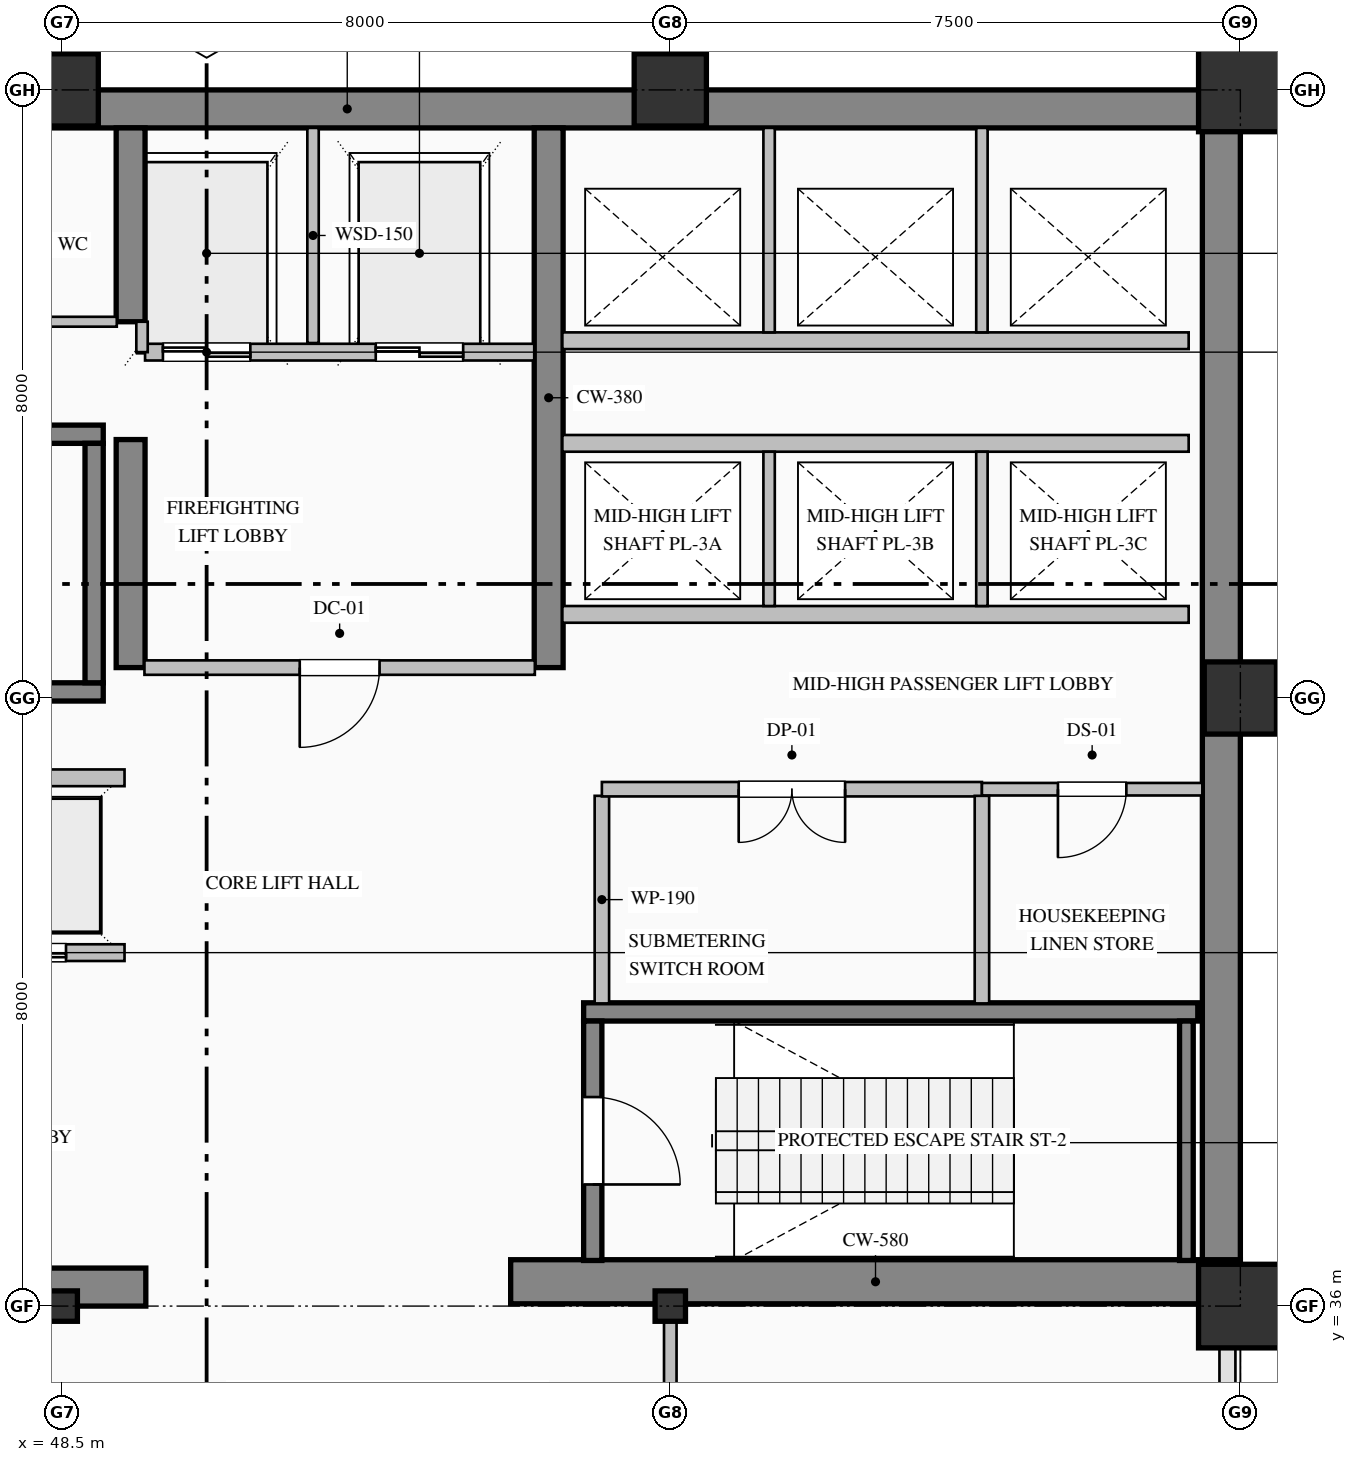
"""IFC4 building model, lengths in metres.
Left out: names, types, materials, properties, quantities, classifications, styles, units other than length and angle.
Written with IfcOpenShell. Run it as: python <this file> out.ifc"""

import sys

from ifc_helpers import new_model, si_unit, direction, frame, frame_2d, origin, origin_2d, place, context, subcontext, project, spatial, rectangle, hollow_rectangle, i_section, extrude, element, fill, save


model = new_model("IFC4")
c1 = context("Model", 3, precision=1e-05, world=origin(), true_north=direction((0.0, 1.0)))
c2 = subcontext(c1, "Body", "Model", "MODEL_VIEW")
j1 = project(units=[si_unit("LENGTHUNIT", "METRE"), si_unit("PLANEANGLEUNIT", "RADIAN")], contexts=[c1])
p1 = place(None, origin())
s1 = spatial("IfcSite", under=j1, at=p1, CompositionType="ELEMENT")
p2 = place(p1, origin())
s2 = spatial("IfcBuilding", under=s1, at=p2, CompositionType="ELEMENT")
p3 = place(p2, frame((0.0, 0.0, 113.6)))
s3 = spatial("IfcBuildingStorey", under=s2, at=p3, CompositionType="ELEMENT", Elevation=113.6)
p4 = place(p3, frame((40.5, 51.75, 0.0), z_axis=(0.0, 0.0, 1.0), x_axis=(1.0, 0.0, 0.0)))
e1 = element("IfcWall", 1, at=p4, inside=s3, PredefinedType="SHEAR", context=c2, shape_type="SweptSolid", body=[
    extrude(rectangle(XDim=23.5, YDim=0.5, at=frame_2d((11.75, 0.0))), origin(), (0.0, 0.0, 1.0), 5.165),
])
p5 = place(p3, frame((63.75, 36.32, 0.0), z_axis=(0.0, 0.0, 1.0), x_axis=(0.0, 1.0, 0.0)))
e2 = element("IfcWall", 2, at=p5, inside=s3, PredefinedType="SHEAR", context=c2, shape_type="SweptSolid", body=[
    extrude(rectangle(XDim=15.18, YDim=0.5, at=frame_2d((7.59, 0.0))), origin(), (0.0, 0.0, 1.0), 5.165),
])
p6 = place(p3, frame((40.5, 36.25, 0.0), z_axis=(0.0, 0.0, 1.0), x_axis=(1.0, 0.0, 0.0)))
e3 = element("IfcWall", 3, at=p6, inside=s3, PredefinedType="SHEAR", context=c2, shape_type="SweptSolid", body=[
    extrude(rectangle(XDim=9.1, YDim=0.5, at=frame_2d((4.55, 0.0))), origin(), (0.0, 0.0, 1.0), 5.165),
])
p7 = place(p3, frame((54.4, 36.32, 0.0), z_axis=(0.0, 0.0, 1.0), x_axis=(1.0, 0.0, 0.0)))
e4 = element("IfcWall", 4, at=p7, inside=s3, PredefinedType="SHEAR", context=c2, shape_type="SweptSolid", body=[
    extrude(rectangle(XDim=9.6, YDim=0.58, at=frame_2d((4.8, 0.0))), origin(), (0.0, 0.0, 1.0), 5.4),
])
p8 = place(p3, frame((49.4, 44.4, 0.0), z_axis=(0.0, 0.0, 1.0), x_axis=(0.0, 1.0, 0.0)))
e5 = element("IfcWall", 5, at=p8, inside=s3, PredefinedType="SHEAR", context=c2, shape_type="SweptSolid", body=[
    extrude(rectangle(XDim=3.0, YDim=0.38, at=frame_2d((1.5, 0.0))), origin(), (0.0, 0.0, 1.0), 5.165),
])
p9 = place(p3, frame((49.4, 48.95, 0.0), z_axis=(0.0, 0.0, 1.0), x_axis=(0.0, 1.0, 0.0)))
e6 = element("IfcWall", 6, at=p9, inside=s3, PredefinedType="SHEAR", context=c2, shape_type="SweptSolid", body=[
    extrude(rectangle(XDim=2.55, YDim=0.38, at=frame_2d((1.275, 0.0))), origin(), (0.0, 0.0, 1.0), 5.165),
])
p10 = place(p3, frame((54.9, 44.4, 0.0), z_axis=(0.0, 0.0, 1.0), x_axis=(0.0, 1.0, 0.0)))
e7 = element("IfcWall", 7, at=p10, inside=s3, PredefinedType="SHEAR", context=c2, shape_type="SweptSolid", body=[
    extrude(rectangle(XDim=7.1, YDim=0.38, at=frame_2d((3.55, 0.0))), origin(), (0.0, 0.0, 1.0), 5.165),
])
p11 = place(p3, frame((48.5, 36.0, 0.0), z_axis=(0.0, 0.0, 1.0), x_axis=(1.0, 0.0, 0.0)))
e8 = element("IfcColumn", 8, at=p11, inside=s3, PredefinedType="COLUMN", context=c2, shape_type="SweptSolid", body=[
    extrude(i_section(OverallWidth=0.4, OverallDepth=0.4, WebThickness=0.013, FlangeThickness=0.021, FilletRadius=0.022, at=origin_2d()), origin(), (0.0, 0.0, 1.0), 5.4),
])
p12 = place(p3, frame((48.5, 52.0, 0.0), z_axis=(0.0, 0.0, 1.0), x_axis=(1.0, 0.0, 0.0)))
e9 = element("IfcColumn", 9, at=p12, inside=s3, PredefinedType="COLUMN", context=c2, shape_type="SweptSolid", body=[
    extrude(hollow_rectangle(XDim=0.95, YDim=0.95, WallThickness=0.036, at=origin_2d()), origin(), (0.0, 0.0, 1.0), 5.4),
])
p13 = place(p3, frame((56.5, 36.0, 0.0), z_axis=(0.0, 0.0, 1.0), x_axis=(1.0, 0.0, 0.0)))
e10 = element("IfcColumn", 10, at=p13, inside=s3, PredefinedType="COLUMN", context=c2, shape_type="SweptSolid", body=[
    extrude(i_section(OverallWidth=0.4, OverallDepth=0.4, WebThickness=0.013, FlangeThickness=0.021, FilletRadius=0.022, at=origin_2d()), origin(), (0.0, 0.0, 1.0), 5.4),
])
p14 = place(p3, frame((56.5, 52.0, 0.0), z_axis=(0.0, 0.0, 1.0), x_axis=(1.0, 0.0, 0.0)))
e11 = element("IfcColumn", 11, at=p14, inside=s3, PredefinedType="COLUMN", context=c2, shape_type="SweptSolid", body=[
    extrude(hollow_rectangle(XDim=0.95, YDim=0.95, WallThickness=0.036, at=origin_2d()), origin(), (0.0, 0.0, 1.0), 5.4),
])
p15 = place(p3, frame((64.0, 36.0, 0.0), z_axis=(0.0, 0.0, 1.0), x_axis=(1.0, 0.0, 0.0)))
e12 = element("IfcColumn", 12, at=p15, inside=s3, PredefinedType="COLUMN", context=c2, shape_type="SweptSolid", body=[
    extrude(hollow_rectangle(XDim=1.1, YDim=1.1, WallThickness=0.04, at=origin_2d()), origin(), (0.0, 0.0, 1.0), 5.4),
])
p16 = place(p3, frame((64.0, 44.0, 0.0), z_axis=(0.0, 0.0, 1.0), x_axis=(1.0, 0.0, 0.0)))
e13 = element("IfcColumn", 13, at=p16, inside=s3, PredefinedType="COLUMN", context=c2, shape_type="SweptSolid", body=[
    extrude(hollow_rectangle(XDim=0.95, YDim=0.95, WallThickness=0.036, at=origin_2d()), origin(), (0.0, 0.0, 1.0), 5.4),
])
p17 = place(p3, frame((64.0, 52.0, 0.0), z_axis=(0.0, 0.0, 1.0), x_axis=(1.0, 0.0, 0.0)))
e14 = element("IfcColumn", 14, at=p17, inside=s3, PredefinedType="COLUMN", context=c2, shape_type="SweptSolid", body=[
    extrude(hollow_rectangle(XDim=1.1, YDim=1.1, WallThickness=0.04, at=origin_2d()), origin(), (0.0, 0.0, 1.0), 5.4),
])
for number, where, z_axis, x_axis in (
    (15, (40.96, 47.47, 0.0), (0.0, 0.0, 1.0), (1.0, 0.0, 0.0)),
    (16, (49.04, 44.08, 0.0), (0.0, 0.0, 1.0), (-1.0, 0.0, 0.0)),
):
    element("IfcWall", number, at=place(p3, frame(where, z_axis=z_axis, x_axis=x_axis)), inside=s3, PredefinedType="SOLIDWALL", context=c2, shape_type="SweptSolid", body=[
        extrude(rectangle(XDim=8.08, YDim=0.24, at=frame_2d((4.04, 0.0))), origin(), (0.0, 0.0, 1.0), 5.4),
    ])
p18 = place(p3, frame((48.92, 44.2, 0.0), z_axis=(0.0, 0.0, 1.0), x_axis=(0.0, 1.0, 0.0)))
e17 = element("IfcWall", 17, at=p18, inside=s3, PredefinedType="SOLIDWALL", context=c2, shape_type="SweptSolid", body=[
    extrude(rectangle(XDim=3.15, YDim=0.24, at=frame_2d((1.575, 0.0))), origin(), (0.0, 0.0, 1.0), 5.4),
])
p19 = place(p3, frame((55.36, 39.87, 0.0), z_axis=(0.0, 0.0, 1.0), x_axis=(1.0, 0.0, 0.0)))
e18 = element("IfcWall", 18, at=p19, inside=s3, PredefinedType="SOLIDWALL", context=c2, shape_type="SweptSolid", body=[
    extrude(rectangle(XDim=8.08, YDim=0.24, at=frame_2d((4.04, 0.0))), origin(), (0.0, 0.0, 1.0), 5.4),
])
p20 = place(p3, frame((55.48, 39.75, 0.0), z_axis=(0.0, 0.0, 1.0), x_axis=(0.0, -1.0, 0.0)))
e19 = element("IfcWall", 19, at=p20, inside=s3, PredefinedType="SOLIDWALL", context=c2, shape_type="SweptSolid", body=[
    extrude(rectangle(XDim=3.15, YDim=0.24, at=frame_2d((1.575, 0.0))), origin(), (0.0, 0.0, 1.0), 5.4),
])
p21 = place(p20, frame((1.0, 0.0, 0.0)))
e20 = element("IfcOpeningElement", 20, at=p21, cuts=e19, PredefinedType="OPENING", context=c2, shape_type="SweptSolid", body=[
    extrude(rectangle(XDim=1.15, YDim=2.2, at=frame_2d((0.575, 1.1))), frame((0.0, 0.13, 0.0), z_axis=(0.0, -1.0, 0.0), x_axis=(1.0, 0.0, 0.0)), (0.0, 0.0, 1.0), 0.26),
])
p22 = place(p3, frame((63.29, 36.6, 0.0), z_axis=(0.0, 0.0, 1.0), x_axis=(0.0, 1.0, 0.0)))
e21 = element("IfcWall", 21, at=p22, inside=s3, PredefinedType="SOLIDWALL", context=c2, shape_type="SweptSolid", body=[
    extrude(rectangle(XDim=3.15, YDim=0.18, at=frame_2d((1.575, 0.0))), origin(), (0.0, 0.0, 1.0), 5.4),
])
p23 = place(p3, frame((54.71, 48.55, 0.0), z_axis=(0.0, 0.0, 1.0), x_axis=(-1.0, 0.0, 0.0)))
e22 = element("IfcWall", 22, at=p23, inside=s3, PredefinedType="PARTITIONING", context=c2, shape_type="SweptSolid", body=[
    extrude(rectangle(XDim=5.12, YDim=0.22, at=frame_2d((2.56, 0.0))), origin(), (0.0, 0.0, 1.0), 5.165),
])
p24 = place(p23, frame((3.735, 0.0, 0.0)))
e23 = element("IfcOpeningElement", 23, at=p24, cuts=e22, PredefinedType="OPENING", context=c2, shape_type="SweptSolid", body=[
    extrude(rectangle(XDim=1.15, YDim=2.2, at=frame_2d((0.575, 1.1))), frame((0.0, 0.12, 0.0), z_axis=(0.0, -1.0, 0.0), x_axis=(1.0, 0.0, 0.0)), (0.0, 0.0, 1.0), 0.24),
])
p25 = place(p23, frame((0.935, 0.0, 0.0)))
e24 = element("IfcOpeningElement", 24, at=p25, cuts=e22, PredefinedType="OPENING", context=c2, shape_type="SweptSolid", body=[
    extrude(rectangle(XDim=1.15, YDim=2.2, at=frame_2d((0.575, 1.1))), frame((0.0, 0.12, 0.0), z_axis=(0.0, -1.0, 0.0), x_axis=(1.0, 0.0, 0.0)), (0.0, 0.0, 1.0), 0.24),
])
p26 = place(p3, frame((51.8, 48.67, 0.0), z_axis=(0.0, 0.0, 1.0), x_axis=(0.0, 1.0, 0.0)))
e25 = element("IfcWall", 25, at=p26, inside=s3, PredefinedType="PARTITIONING", context=c2, shape_type="SweptSolid", body=[
    extrude(rectangle(XDim=2.83, YDim=0.15, at=frame_2d((1.415, 0.0))), origin(), (0.0, 0.0, 1.0), 5.165),
])
p27 = place(p3, frame((49.55, 48.55, 0.0), z_axis=(0.0, 0.0, 1.0), x_axis=(0.0, 1.0, 0.0)))
e26 = element("IfcWall", 26, at=p27, inside=s3, PredefinedType="PARTITIONING", context=c2, shape_type="SweptSolid", body=[
    extrude(rectangle(XDim=0.4, YDim=0.15, at=frame_2d((0.2, 0.0))), origin(), (0.0, 0.0, 1.0), 5.165),
])
p28 = place(p3, frame((49.32, 40.65, 0.0), z_axis=(0.0, 0.0, 1.0), x_axis=(-1.0, 0.0, 0.0)))
e27 = element("IfcWall", 27, at=p28, inside=s3, PredefinedType="PARTITIONING", context=c2, shape_type="SweptSolid", body=[
    extrude(rectangle(XDim=8.24, YDim=0.22, at=frame_2d((4.12, 0.0))), origin(), (0.0, 0.0, 1.0), 5.165),
])
p29 = place(p28, frame((6.37, 0.0, 0.0)))
e28 = element("IfcOpeningElement", 28, at=p29, cuts=e27, PredefinedType="OPENING", context=c2, shape_type="SweptSolid", body=[
    extrude(rectangle(XDim=1.1, YDim=2.2, at=frame_2d((0.55, 1.1))), frame((0.0, 0.12, 0.0), z_axis=(0.0, -1.0, 0.0), x_axis=(1.0, 0.0, 0.0)), (0.0, 0.0, 1.0), 0.24),
])
p30 = place(p28, frame((3.57, 0.0, 0.0)))
e29 = element("IfcOpeningElement", 29, at=p30, cuts=e27, PredefinedType="OPENING", context=c2, shape_type="SweptSolid", body=[
    extrude(rectangle(XDim=1.1, YDim=2.2, at=frame_2d((0.55, 1.1))), frame((0.0, 0.12, 0.0), z_axis=(0.0, -1.0, 0.0), x_axis=(1.0, 0.0, 0.0)), (0.0, 0.0, 1.0), 0.24),
])
p31 = place(p28, frame((0.77, 0.0, 0.0)))
e30 = element("IfcOpeningElement", 30, at=p31, cuts=e27, PredefinedType="OPENING", context=c2, shape_type="SweptSolid", body=[
    extrude(rectangle(XDim=1.1, YDim=2.2, at=frame_2d((0.55, 1.1))), frame((0.0, 0.12, 0.0), z_axis=(0.0, -1.0, 0.0), x_axis=(1.0, 0.0, 0.0)), (0.0, 0.0, 1.0), 0.24),
])
for number, where, z_axis, x_axis in (
    (31, (41.08, 42.95, 0.0), (0.0, 0.0, 1.0), (1.0, 0.0, 0.0)),
    (32, (63.32, 45.1, 0.0), (0.0, 0.0, 1.0), (-1.0, 0.0, 0.0)),
    (33, (55.08, 47.35, 0.0), (0.0, 0.0, 1.0), (1.0, 0.0, 0.0)),
):
    element("IfcWall", number, at=place(p3, frame(where, z_axis=z_axis, x_axis=x_axis)), inside=s3, PredefinedType="PARTITIONING", context=c2, shape_type="SweptSolid", body=[
        extrude(rectangle(XDim=8.24, YDim=0.22, at=frame_2d((4.12, 0.0))), origin(), (0.0, 0.0, 1.0), 5.165),
    ])
for number, where, z_axis, x_axis in (
    (34, (57.8, 45.21, 0.0), (0.0, 0.0, 1.0), (0.0, 1.0, 0.0)),
    (35, (60.6, 45.21, 0.0), (0.0, 0.0, 1.0), (0.0, 1.0, 0.0)),
):
    element("IfcWall", number, at=place(p3, frame(where, z_axis=z_axis, x_axis=x_axis)), inside=s3, PredefinedType="PARTITIONING", context=c2, shape_type="SweptSolid", body=[
        extrude(rectangle(XDim=2.03, YDim=0.15, at=frame_2d((1.015, 0.0))), origin(), (0.0, 0.0, 1.0), 5.165),
    ])
p32 = place(p3, frame((63.32, 48.7, 0.0), z_axis=(0.0, 0.0, 1.0), x_axis=(-1.0, 0.0, 0.0)))
e36 = element("IfcWall", 36, at=p32, inside=s3, PredefinedType="PARTITIONING", context=c2, shape_type="SweptSolid", body=[
    extrude(rectangle(XDim=8.24, YDim=0.22, at=frame_2d((4.12, 0.0))), origin(), (0.0, 0.0, 1.0), 5.165),
])
for number, where, z_axis, x_axis in (
    (37, (57.8, 48.81, 0.0), (0.0, 0.0, 1.0), (0.0, 1.0, 0.0)),
    (38, (60.6, 48.81, 0.0), (0.0, 0.0, 1.0), (0.0, 1.0, 0.0)),
):
    element("IfcWall", number, at=place(p3, frame(where, z_axis=z_axis, x_axis=x_axis)), inside=s3, PredefinedType="PARTITIONING", context=c2, shape_type="SweptSolid", body=[
        extrude(rectangle(XDim=2.69, YDim=0.15, at=frame_2d((1.345, 0.0))), origin(), (0.0, 0.0, 1.0), 5.165),
    ])
p33 = place(p3, frame((43.5, 48.95, 0.0), z_axis=(0.0, 0.0, 1.0), x_axis=(1.0, 0.0, 0.0)))
e39 = element("IfcWall", 39, at=p33, inside=s3, PredefinedType="PARTITIONING", context=c2, shape_type="SweptSolid", body=[
    extrude(rectangle(XDim=5.718, YDim=0.13, at=frame_2d((2.859, 0.0))), origin(), (0.0, 0.0, 1.0), 5.165),
])
p34 = place(p33, frame((2.399, 0.0, 0.0)))
e40 = element("IfcOpeningElement", 40, at=p34, cuts=e39, PredefinedType="OPENING", context=c2, shape_type="SweptSolid", body=[
    extrude(rectangle(XDim=0.92, YDim=2.15, at=frame_2d((0.46, 1.075))), frame((0.0, 0.075, 0.0), z_axis=(0.0, -1.0, 0.0), x_axis=(1.0, 0.0, 0.0)), (0.0, 0.0, 1.0), 0.15),
])
p35 = place(p3, frame((54.718, 44.4, 0.0), z_axis=(0.0, 0.0, 1.0), x_axis=(-1.0, 0.0, 0.0)))
e41 = element("IfcWall", 41, at=p35, inside=s3, PredefinedType="PARTITIONING", context=c2, shape_type="SweptSolid", body=[
    extrude(rectangle(XDim=5.136, YDim=0.19, at=frame_2d((2.568, 0.0))), origin(), (0.0, 0.0, 1.0), 5.165),
])
p36 = place(p35, frame((2.043, 0.0, 0.0)))
e42 = element("IfcOpeningElement", 42, at=p36, cuts=e41, PredefinedType="OPENING", context=c2, shape_type="SweptSolid", body=[
    extrude(rectangle(XDim=1.05, YDim=2.15, at=frame_2d((0.525, 1.075))), frame((0.0, 0.105, 0.0), z_axis=(0.0, -1.0, 0.0), x_axis=(1.0, 0.0, 0.0)), (0.0, 0.0, 1.0), 0.21),
])
p37 = place(p3, frame((55.6, 42.713, 0.0), z_axis=(0.0, 0.0, 1.0), x_axis=(0.0, -1.0, 0.0)))
e43 = element("IfcWall", 43, at=p37, inside=s3, PredefinedType="PARTITIONING", context=c2, shape_type="SweptSolid", body=[
    extrude(rectangle(XDim=2.731, YDim=0.19, at=frame_2d((1.365, 0.0))), origin(), (0.0, 0.0, 1.0), 5.165),
])
p38 = place(p3, frame((60.6, 42.8, 0.0), z_axis=(0.0, 0.0, 1.0), x_axis=(-1.0, 0.0, 0.0)))
e44 = element("IfcWall", 44, at=p38, inside=s3, PredefinedType="PARTITIONING", context=c2, shape_type="SweptSolid", body=[
    extrude(rectangle(XDim=5.0, YDim=0.19, at=frame_2d((2.5, 0.0))), origin(), (0.0, 0.0, 1.0), 5.165),
])
p39 = place(p38, frame((1.8, 0.0, 0.0)))
e45 = element("IfcOpeningElement", 45, at=p39, cuts=e44, PredefinedType="OPENING", context=c2, shape_type="SweptSolid", body=[
    extrude(rectangle(XDim=1.4, YDim=2.25, at=frame_2d((0.7, 1.125))), frame((0.0, 0.105, 0.0), z_axis=(0.0, -1.0, 0.0), x_axis=(1.0, 0.0, 0.0)), (0.0, 0.0, 1.0), 0.21),
])
p40 = place(p3, frame((63.5, 42.8, 0.0), z_axis=(0.0, 0.0, 1.0), x_axis=(-1.0, 0.0, 0.0)))
e46 = element("IfcWall", 46, at=p40, inside=s3, PredefinedType="PARTITIONING", context=c2, shape_type="SweptSolid", body=[
    extrude(rectangle(XDim=2.9, YDim=0.165, at=frame_2d((1.45, 0.0))), origin(), (0.0, 0.0, 1.0), 5.165),
])
p41 = place(p40, frame((1.0, 0.0, 0.0)))
e47 = element("IfcOpeningElement", 47, at=p41, cuts=e46, PredefinedType="OPENING", context=c2, shape_type="SweptSolid", body=[
    extrude(rectangle(XDim=0.9, YDim=2.15, at=frame_2d((0.45, 1.075))), frame((0.0, 0.093, 0.0), z_axis=(0.0, -1.0, 0.0), x_axis=(1.0, 0.0, 0.0)), (0.0, 0.0, 1.0), 0.185),
])
p42 = place(p3, frame((60.6, 42.713, 0.0), z_axis=(0.0, 0.0, 1.0), x_axis=(0.0, -1.0, 0.0)))
e48 = element("IfcWall", 48, at=p42, inside=s3, PredefinedType="PARTITIONING", context=c2, shape_type="SweptSolid", body=[
    extrude(rectangle(XDim=2.731, YDim=0.19, at=frame_2d((1.365, 0.0))), origin(), (0.0, 0.0, 1.0), 5.165),
])
p43 = place(p3, frame((56.5, 36.0, 0.0), z_axis=(0.0, 0.0, 1.0), x_axis=(0.0, -1.0, 0.0)))
e49 = element("IfcWall", 49, at=p43, inside=s3, PredefinedType="PARTITIONING", context=c2, shape_type="SweptSolid", body=[
    extrude(rectangle(XDim=2.325, YDim=0.165, at=frame_2d((1.163, 0.0))), origin(), (0.0, 0.0, 1.0), 4.557),
])
p44 = place(p21, origin())
e50 = element("IfcDoor", 50, at=p44, inside=s3, OperationType="SINGLE_SWING_RIGHT", PredefinedType="DOOR", context=c2, shape_type="SweptSolid", body=[
    extrude(rectangle(XDim=1.15, YDim=2.2, at=frame_2d((0.575, 1.1))), frame((0.0, 0.025, 0.0), z_axis=(0.0, -1.0, 0.0), x_axis=(1.0, 0.0, 0.0)), (0.0, 0.0, 1.0), 0.05),
])
fill(e20, e50)
p45 = place(p24, origin())
e51 = element("IfcDoor", 51, at=p45, inside=s3, OperationType="DOUBLE_DOOR_SLIDING", PredefinedType="DOOR", context=c2, shape_type="SweptSolid", body=[
    extrude(rectangle(XDim=1.15, YDim=2.2, at=frame_2d((0.575, 1.1))), frame((0.0, 0.025, 0.0), z_axis=(0.0, -1.0, 0.0), x_axis=(1.0, 0.0, 0.0)), (0.0, 0.0, 1.0), 0.05),
])
fill(e23, e51)
p46 = place(p25, origin())
e52 = element("IfcDoor", 52, at=p46, inside=s3, OperationType="DOUBLE_DOOR_SLIDING", PredefinedType="DOOR", context=c2, shape_type="SweptSolid", body=[
    extrude(rectangle(XDim=1.15, YDim=2.2, at=frame_2d((0.575, 1.1))), frame((0.0, 0.025, 0.0), z_axis=(0.0, -1.0, 0.0), x_axis=(1.0, 0.0, 0.0)), (0.0, 0.0, 1.0), 0.05),
])
fill(e24, e52)
p47 = place(p31, origin())
e53 = element("IfcDoor", 53, at=p47, inside=s3, OperationType="DOUBLE_DOOR_SLIDING", PredefinedType="DOOR", context=c2, shape_type="SweptSolid", body=[
    extrude(rectangle(XDim=1.1, YDim=2.2, at=frame_2d((0.55, 1.1))), frame((0.0, 0.025, 0.0), z_axis=(0.0, -1.0, 0.0), x_axis=(1.0, 0.0, 0.0)), (0.0, 0.0, 1.0), 0.05),
])
fill(e30, e53)
p48 = place(p36, origin())
e54 = element("IfcDoor", 54, at=p48, inside=s3, OperationType="SINGLE_SWING_RIGHT", PredefinedType="DOOR", context=c2, shape_type="SweptSolid", body=[
    extrude(rectangle(XDim=1.05, YDim=2.15, at=frame_2d((0.525, 1.075))), frame((0.0, 0.025, 0.0), z_axis=(0.0, -1.0, 0.0), x_axis=(1.0, 0.0, 0.0)), (0.0, 0.0, 1.0), 0.05),
])
fill(e42, e54)
p49 = place(p39, origin())
e55 = element("IfcDoor", 55, at=p49, inside=s3, OperationType="DOUBLE_DOOR_SINGLE_SWING", PredefinedType="DOOR", context=c2, shape_type="SweptSolid", body=[
    extrude(rectangle(XDim=1.4, YDim=2.25, at=frame_2d((0.7, 1.125))), frame((0.0, 0.025, 0.0), z_axis=(0.0, -1.0, 0.0), x_axis=(1.0, 0.0, 0.0)), (0.0, 0.0, 1.0), 0.05),
])
fill(e45, e55)
p50 = place(p41, origin())
e56 = element("IfcDoor", 56, at=p50, inside=s3, OperationType="SINGLE_SWING_RIGHT", PredefinedType="DOOR", context=c2, shape_type="SweptSolid", body=[
    extrude(rectangle(XDim=0.9, YDim=2.15, at=frame_2d((0.45, 1.075))), frame((0.0, 0.025, 0.0), z_axis=(0.0, -1.0, 0.0), x_axis=(1.0, 0.0, 0.0)), (0.0, 0.0, 1.0), 0.05),
])
fill(e47, e56)
save(model, sys.argv[1])
